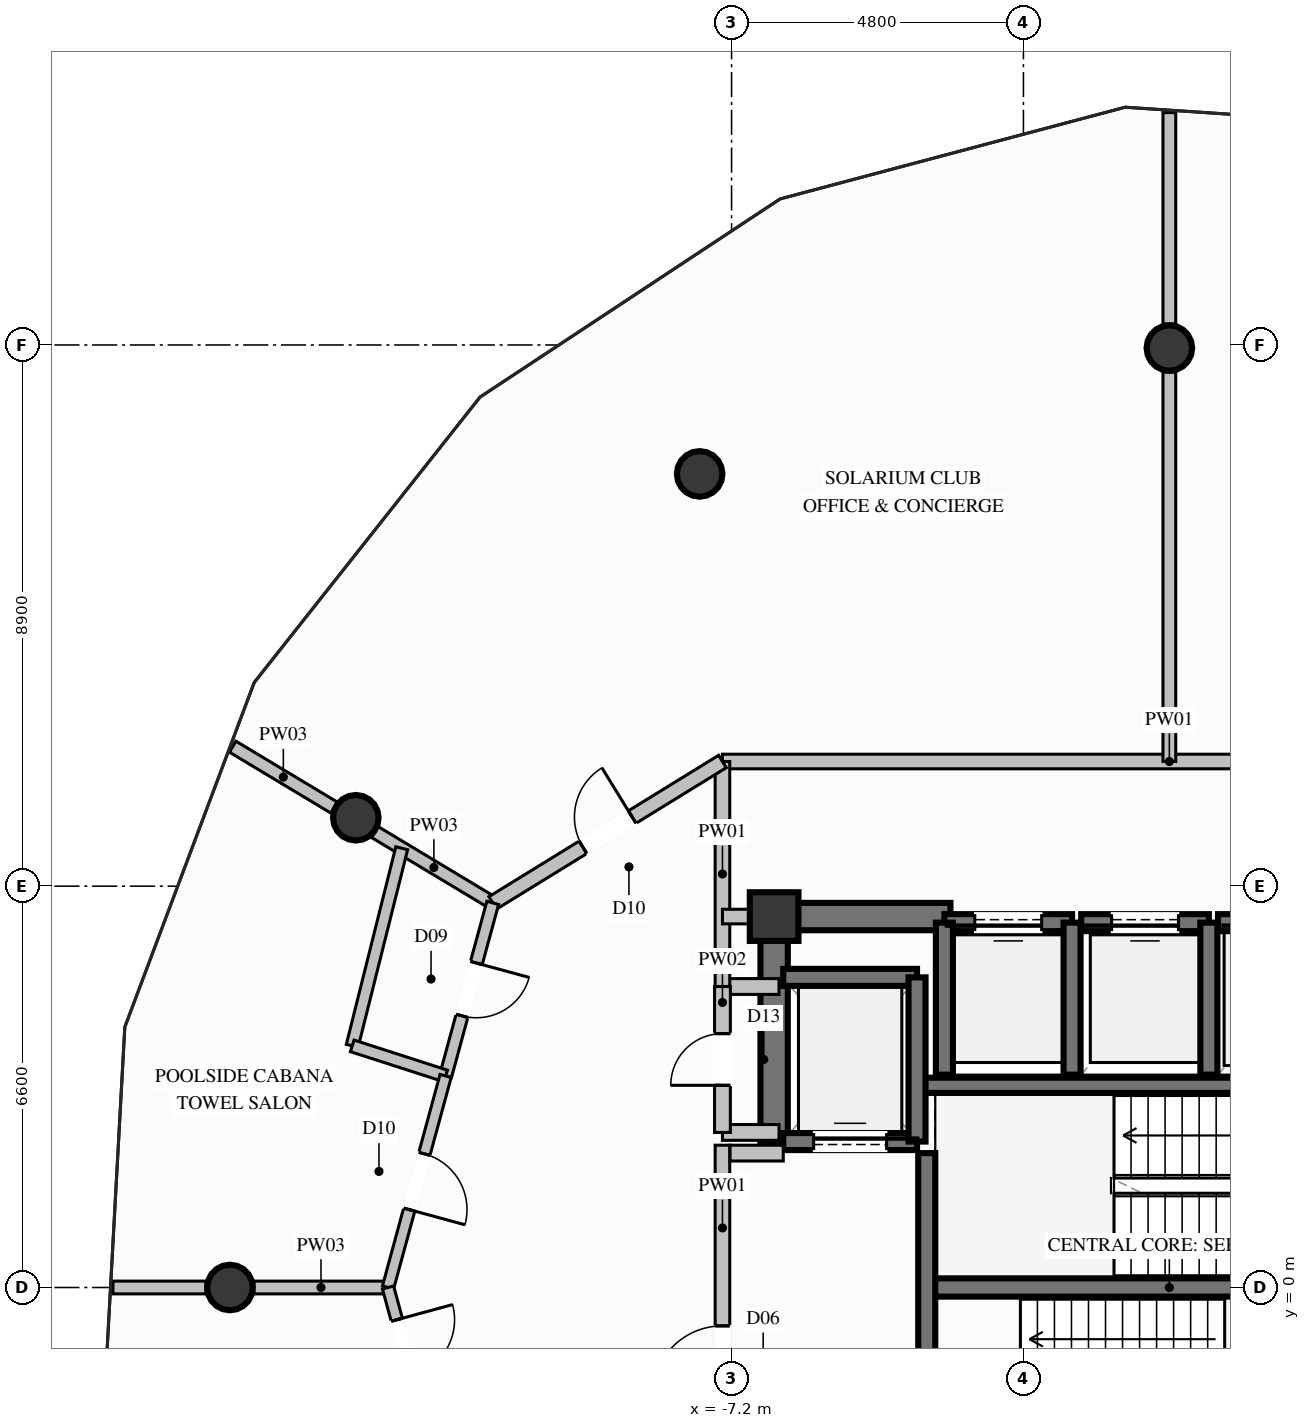
"""IFC4 building model, lengths in metres.
Left out: names, types, materials, properties, quantities, classifications, styles, units other than length and angle.
Written with IfcOpenShell. Run it as: python <this file> out.ifc"""

import sys

from ifc_helpers import new_model, si_unit, direction, frame, frame_2d, origin, origin_2d, place, context, subcontext, project, spatial, rectangle, circle, extrude, element, fill, save


model = new_model("IFC4")
c1 = context("Model", 3, precision=1e-05, world=origin(), true_north=direction((0.0, 1.0)))
c2 = subcontext(c1, "Body", "Model", "MODEL_VIEW")
j1 = project(units=[si_unit("LENGTHUNIT", "METRE"), si_unit("PLANEANGLEUNIT", "RADIAN")], contexts=[c1])
p1 = place(None, origin())
s1 = spatial("IfcSite", under=j1, at=p1, CompositionType="ELEMENT")
p2 = place(p1, origin())
s2 = spatial("IfcBuilding", under=s1, at=p2, CompositionType="ELEMENT")
p3 = place(p2, frame((0.0, 0.0, 262.0)))
s3 = spatial("IfcBuildingStorey", under=s2, at=p3, CompositionType="ELEMENT", Elevation=262.0)
p4 = place(p3, frame((-6.5, 6.1, 0.0), z_axis=(0.0, 0.0, 1.0), x_axis=(1.0, 0.0, 0.0)))
e1 = element("IfcColumn", 1, at=p4, inside=s3, PredefinedType="COLUMN", context=c2, shape_type="SweptSolid", body=[
    extrude(rectangle(XDim=0.8, YDim=0.8, at=origin_2d()), origin(), (0.0, 0.0, 1.0), 4.8),
])
p5 = place(p3, frame((-3.99, 0.0, 0.0), z_axis=(0.0, 0.0, 1.0), x_axis=(1.0, 0.0, 0.0)))
e2 = element("IfcWall", 2, at=p5, inside=s3, PredefinedType="SHEAR", context=c2, shape_type="SweptSolid", body=[
    extrude(rectangle(XDim=7.98, YDim=0.3, at=frame_2d((3.99, 0.0))), origin(), (0.0, 0.0, 1.0), 4.8),
])
p6 = place(p3, frame((-4.13, 3.325, 0.0), z_axis=(0.0, 0.0, 1.0), x_axis=(1.0, 0.0, 0.0)))
e3 = element("IfcWall", 3, at=p6, inside=s3, PredefinedType="SOLIDWALL", context=c2, shape_type="SweptSolid", body=[
    extrude(rectangle(XDim=8.26, YDim=0.25, at=frame_2d((4.13, 0.0))), origin(), (0.0, 0.0, 1.0), 4.8),
])
p7 = place(p3, frame((-6.275, 6.1, 0.0), z_axis=(0.0, 0.0, 1.0), x_axis=(1.0, 0.0, 0.0)))
e4 = element("IfcWall", 4, at=p7, inside=s3, PredefinedType="SHEAR", context=c2, shape_type="SweptSolid", body=[
    extrude(rectangle(XDim=2.675, YDim=0.45, at=frame_2d((1.337, 0.0))), origin(), (0.0, 0.0, 1.0), 4.8),
])
p8 = place(p3, frame((-6.5, 2.35, 0.0), z_axis=(0.0, 0.0, 1.0), x_axis=(0.0, 1.0, 0.0)))
e5 = element("IfcWall", 5, at=p8, inside=s3, PredefinedType="SHEAR", context=c2, shape_type="SweptSolid", body=[
    extrude(rectangle(XDim=3.975, YDim=0.45, at=frame_2d((1.987, 0.0))), origin(), (0.0, 0.0, 1.0), 4.8),
])
for number, where, z_axis, x_axis in (
    (6, (0.0, 15.45, 0.0), (0.0, 0.0, 1.0), (1.0, 0.0, 0.0)),
    (7, (-7.725, 13.38, 0.0), (0.0, 0.0, 1.0), (1.0, 0.0, 0.0)),
    (8, (-13.38, 7.725, 0.0), (0.0, 0.0, 1.0), (1.0, 0.0, 0.0)),
    (9, (-15.45, 0.0, 0.0), (0.0, 0.0, 1.0), (1.0, 0.0, 0.0)),
):
    element("IfcColumn", number, at=place(p3, frame(where, z_axis=z_axis, x_axis=x_axis)), inside=s3, PredefinedType="COLUMN", context=c2, shape_type="SweptSolid", body=[
        extrude(circle(Radius=0.375, at=origin_2d()), origin(), (0.0, 0.0, 1.0), 4.8),
    ])
p9 = place(p3, frame((-1.6, 6.0, 0.0), z_axis=(0.0, 0.0, 1.0), x_axis=(-1.0, 0.0, 0.0)))
e10 = element("IfcWall", 10, at=p9, inside=s3, PredefinedType="SOLIDWALL", context=c2, shape_type="SweptSolid", body=[
    extrude(rectangle(XDim=2.1, YDim=0.28, at=frame_2d((1.05, 0.0))), origin(), (0.0, 0.0, 1.0), 4.57),
])
p10 = place(p9, frame((0.5, 0.0, 0.0)))
e11 = element("IfcOpeningElement", 11, at=p10, cuts=e10, PredefinedType="OPENING", context=c2, shape_type="SweptSolid", body=[
    extrude(rectangle(XDim=1.1, YDim=2.2, at=frame_2d((0.55, 1.1))), frame((0.0, 0.15, 0.0), z_axis=(0.0, -1.0, 0.0), x_axis=(1.0, 0.0, 0.0)), (0.0, 0.0, 1.0), 0.3),
])
for number, where, z_axis, x_axis in (
    (12, (-3.7, 6.0, 0.0), (0.0, 0.0, 1.0), (0.0, -1.0, 0.0)),
    (13, (-1.6, 3.5, 0.0), (0.0, 0.0, 1.0), (0.0, 1.0, 0.0)),
):
    element("IfcWall", number, at=place(p3, frame(where, z_axis=z_axis, x_axis=x_axis)), inside=s3, PredefinedType="SOLIDWALL", context=c2, shape_type="SweptSolid", body=[
        extrude(rectangle(XDim=2.5, YDim=0.28, at=frame_2d((1.25, 0.0))), origin(), (0.0, 0.0, 1.0), 4.57),
    ])
p11 = place(p3, frame((0.65, 6.0, 0.0), z_axis=(0.0, 0.0, 1.0), x_axis=(-1.0, 0.0, 0.0)))
e14 = element("IfcWall", 14, at=p11, inside=s3, PredefinedType="SOLIDWALL", context=c2, shape_type="SweptSolid", body=[
    extrude(rectangle(XDim=2.1, YDim=0.28, at=frame_2d((1.05, 0.0))), origin(), (0.0, 0.0, 1.0), 4.57),
])
p12 = place(p11, frame((0.5, 0.0, 0.0)))
e15 = element("IfcOpeningElement", 15, at=p12, cuts=e14, PredefinedType="OPENING", context=c2, shape_type="SweptSolid", body=[
    extrude(rectangle(XDim=1.1, YDim=2.2, at=frame_2d((0.55, 1.1))), frame((0.0, 0.15, 0.0), z_axis=(0.0, -1.0, 0.0), x_axis=(1.0, 0.0, 0.0)), (0.0, 0.0, 1.0), 0.3),
])
p13 = place(p3, frame((0.65, 3.5, 0.0), z_axis=(0.0, 0.0, 1.0), x_axis=(0.0, 1.0, 0.0)))
e16 = element("IfcWall", 16, at=p13, inside=s3, PredefinedType="SOLIDWALL", context=c2, shape_type="SweptSolid", body=[
    extrude(rectangle(XDim=2.5, YDim=0.28, at=frame_2d((1.25, 0.0))), origin(), (0.0, 0.0, 1.0), 4.57),
])
p14 = place(p3, frame((3.0, 6.0, 0.0), z_axis=(0.0, 0.0, 1.0), x_axis=(-1.0, 0.0, 0.0)))
e17 = element("IfcWall", 17, at=p14, inside=s3, PredefinedType="SOLIDWALL", context=c2, shape_type="SweptSolid", body=[
    extrude(rectangle(XDim=2.2, YDim=0.28, at=frame_2d((1.1, 0.0))), origin(), (0.0, 0.0, 1.0), 4.57),
])
p15 = place(p14, frame((0.55, 0.0, 0.0)))
e18 = element("IfcOpeningElement", 18, at=p15, cuts=e17, PredefinedType="OPENING", context=c2, shape_type="SweptSolid", body=[
    extrude(rectangle(XDim=1.1, YDim=2.2, at=frame_2d((0.55, 1.1))), frame((0.0, 0.15, 0.0), z_axis=(0.0, -1.0, 0.0), x_axis=(1.0, 0.0, 0.0)), (0.0, 0.0, 1.0), 0.3),
])
p16 = place(p3, frame((-6.35, 2.4, 0.0), z_axis=(0.0, 0.0, 1.0), x_axis=(1.0, 0.0, 0.0)))
e19 = element("IfcWall", 19, at=p16, inside=s3, PredefinedType="SOLIDWALL", context=c2, shape_type="SweptSolid", body=[
    extrude(rectangle(XDim=2.2, YDim=0.28, at=frame_2d((1.1, 0.0))), origin(), (0.0, 0.0, 1.0), 4.57),
])
p17 = place(p16, frame((0.5, 0.0, 0.0)))
e20 = element("IfcOpeningElement", 20, at=p17, cuts=e19, PredefinedType="OPENING", context=c2, shape_type="SweptSolid", body=[
    extrude(rectangle(XDim=1.2, YDim=2.2, at=frame_2d((0.6, 1.1))), frame((0.0, 0.15, 0.0), z_axis=(0.0, -1.0, 0.0), x_axis=(1.0, 0.0, 0.0)), (0.0, 0.0, 1.0), 0.3),
])
p18 = place(p3, frame((-4.15, 5.1, 0.0), z_axis=(0.0, 0.0, 1.0), x_axis=(-1.0, 0.0, 0.0)))
e21 = element("IfcWall", 21, at=p18, inside=s3, PredefinedType="SOLIDWALL", context=c2, shape_type="SweptSolid", body=[
    extrude(rectangle(XDim=2.2, YDim=0.28, at=frame_2d((1.1, 0.0))), origin(), (0.0, 0.0, 1.0), 4.57),
])
p19 = place(p3, frame((-4.15, 2.4, 0.0), z_axis=(0.0, 0.0, 1.0), x_axis=(0.0, 1.0, 0.0)))
e22 = element("IfcWall", 22, at=p19, inside=s3, PredefinedType="SOLIDWALL", context=c2, shape_type="SweptSolid", body=[
    extrude(rectangle(XDim=2.7, YDim=0.28, at=frame_2d((1.35, 0.0))), origin(), (0.0, 0.0, 1.0), 4.57),
])
p20 = place(p3, frame((-3.99, -3.25, 0.0), z_axis=(0.0, 0.0, 1.0), x_axis=(0.0, 1.0, 0.0)))
e23 = element("IfcWall", 23, at=p20, inside=s3, PredefinedType="SOLIDWALL", context=c2, shape_type="SweptSolid", body=[
    extrude(rectangle(XDim=5.46, YDim=0.28, at=frame_2d((2.73, 0.0))), origin(), (0.0, 0.0, 1.0), 4.57),
])
p21 = place(p20, frame((0.937, 0.0, 0.0)))
e24 = element("IfcOpeningElement", 24, at=p21, cuts=e23, PredefinedType="OPENING", context=c2, shape_type="SweptSolid", body=[
    extrude(rectangle(XDim=1.2, YDim=2.2, at=frame_2d((0.6, 1.1))), frame((0.0, 0.15, 0.0), z_axis=(0.0, -1.0, 0.0), x_axis=(1.0, 0.0, 0.0)), (0.0, 0.0, 1.0), 0.3),
])
p22 = place(p3, frame((-7.35, -3.38, 0.0), z_axis=(0.0, 0.0, 1.0), x_axis=(0.0, 1.0, 0.0)))
e25 = element("IfcWall", 25, at=p22, inside=s3, PredefinedType="PARTITIONING", context=c2, shape_type="SweptSolid", body=[
    extrude(rectangle(XDim=5.72, YDim=0.24, at=frame_2d((2.86, 0.0))), origin(), (0.0, 0.0, 1.0), 3.455),
])
p23 = place(p22, frame((1.599, 0.0, 0.0)))
e26 = element("IfcOpeningElement", 26, at=p23, cuts=e25, PredefinedType="OPENING", context=c2, shape_type="SweptSolid", body=[
    extrude(rectangle(XDim=1.15, YDim=2.2, at=frame_2d((0.575, 1.1))), frame((0.0, 0.13, 0.0), z_axis=(0.0, -1.0, 0.0), x_axis=(1.0, 0.0, 0.0)), (0.0, 0.0, 1.0), 0.26),
])
p24 = place(p3, frame((-7.225, 2.21, 0.0), z_axis=(0.0, 0.0, 1.0), x_axis=(1.0, 0.0, 0.0)))
e27 = element("IfcWall", 27, at=p24, inside=s3, PredefinedType="PARTITIONING", context=c2, shape_type="SweptSolid", body=[
    extrude(rectangle(XDim=0.875, YDim=0.26, at=frame_2d((0.438, 0.0))), origin(), (0.0, 0.0, 1.0), 4.57),
])
for number, where, z_axis, x_axis in (
    (28, (-7.35, 4.95, 0.0), (0.0, 0.0, 1.0), (1.0, 0.0, 0.0)),
    (29, (-7.35, 2.55, 0.0), (0.0, 0.0, 1.0), (1.0, 0.0, 0.0)),
):
    element("IfcWall", number, at=place(p3, frame(where, z_axis=z_axis, x_axis=x_axis)), inside=s3, PredefinedType="PARTITIONING", context=c2, shape_type="SweptSolid", body=[
        extrude(rectangle(XDim=0.93, YDim=0.26, at=frame_2d((0.465, 0.0))), origin(), (0.0, 0.0, 1.0), 4.57),
    ])
p25 = place(p3, frame((-7.35, 2.55, 0.0), z_axis=(0.0, 0.0, 1.0), x_axis=(0.0, 1.0, 0.0)))
e30 = element("IfcWall", 30, at=p25, inside=s3, PredefinedType="PARTITIONING", context=c2, shape_type="SweptSolid", body=[
    extrude(rectangle(XDim=2.4, YDim=0.26, at=frame_2d((1.2, 0.0))), origin(), (0.0, 0.0, 1.0), 3.455),
])
p26 = place(p25, frame((0.775, 0.0, 0.0)))
e31 = element("IfcOpeningElement", 31, at=p26, cuts=e30, PredefinedType="OPENING", context=c2, shape_type="SweptSolid", body=[
    extrude(rectangle(XDim=0.85, YDim=2.05, at=frame_2d((0.425, 1.025))), frame((0.0, 0.14, 0.0), z_axis=(0.0, -1.0, 0.0), x_axis=(1.0, 0.0, 0.0)), (0.0, 0.0, 1.0), 0.28),
])
p27 = place(p3, frame((-7.35, 8.65, 0.0), z_axis=(0.0, 0.0, 1.0), x_axis=(1.0, 0.0, 0.0)))
e32 = element("IfcWall", 32, at=p27, inside=s3, PredefinedType="PARTITIONING", context=c2, shape_type="SweptSolid", body=[
    extrude(rectangle(XDim=14.7, YDim=0.24, at=frame_2d((7.35, 0.0))), origin(), (0.0, 0.0, 1.0), 4.57),
])
p28 = place(p3, frame((-7.35, 4.95, 0.0), z_axis=(0.0, 0.0, 1.0), x_axis=(0.0, 1.0, 0.0)))
e33 = element("IfcWall", 33, at=p28, inside=s3, PredefinedType="PARTITIONING", context=c2, shape_type="SweptSolid", body=[
    extrude(rectangle(XDim=3.7, YDim=0.24, at=frame_2d((1.85, 0.0))), origin(), (0.0, 0.0, 1.0), 3.455),
])
p29 = place(p3, frame((-7.35, 6.1, 0.0), z_axis=(0.0, 0.0, 1.0), x_axis=(1.0, 0.0, 0.0)))
e34 = element("IfcWall", 34, at=p29, inside=s3, PredefinedType="PARTITIONING", context=c2, shape_type="SweptSolid", body=[
    extrude(rectangle(XDim=0.85, YDim=0.24, at=frame_2d((0.425, 0.0))), origin(), (0.0, 0.0, 1.0), 4.011),
])
p30 = place(p3, frame((-11.128, 6.325, 0.0), z_axis=(0.0, 0.0, 1.0), x_axis=(-0.857206654834, 0.514972572967, 0.0)))
e35 = element("IfcWall", 35, at=p30, inside=s3, PredefinedType="PARTITIONING", context=c2, shape_type="SweptSolid", body=[
    extrude(rectangle(XDim=2.259, YDim=0.21, at=frame_2d((1.129, 0.0))), origin(), (0.0, 0.0, 1.0), 4.011),
])
p31 = place(p3, frame((-13.738, 7.893, 0.0), z_axis=(0.0, 0.0, 1.0), x_axis=(-0.857315615311, 0.514791157407, 0.0)))
e36 = element("IfcWall", 36, at=p31, inside=s3, PredefinedType="PARTITIONING", context=c2, shape_type="SweptSolid", body=[
    extrude(rectangle(XDim=1.944, YDim=0.21, at=frame_2d((0.972, 0.0))), origin(), (0.0, 0.0, 1.0), 4.57),
])
p32 = place(p3, frame((-12.85, 0.0, 0.0), z_axis=(0.0, 0.0, 1.0), x_axis=(-1.0, 0.0, 0.0)))
e37 = element("IfcWall", 37, at=p32, inside=s3, PredefinedType="PARTITIONING", context=c2, shape_type="SweptSolid", body=[
    extrude(rectangle(XDim=2.205, YDim=0.21, at=frame_2d((1.103, 0.0))), origin(), (0.0, 0.0, 1.0), 4.57),
])
p33 = place(p3, frame((-15.845, 0.0, 0.0), z_axis=(0.0, 0.0, 1.0), x_axis=(-1.0, 0.0, 0.0)))
e38 = element("IfcWall", 38, at=p33, inside=s3, PredefinedType="PARTITIONING", context=c2, shape_type="SweptSolid", body=[
    extrude(rectangle(XDim=1.529, YDim=0.21, at=frame_2d((0.765, 0.0))), origin(), (0.0, 0.0, 1.0), 4.57),
])
p34 = place(p3, frame((0.0, 8.65, 0.0), z_axis=(0.0, 0.0, 1.0), x_axis=(0.0, 1.0, 0.0)))
e39 = element("IfcWall", 39, at=p34, inside=s3, PredefinedType="PARTITIONING", context=c2, shape_type="SweptSolid", body=[
    extrude(rectangle(XDim=6.405, YDim=0.21, at=frame_2d((3.203, 0.0))), origin(), (0.0, 0.0, 1.0), 4.57),
])
p35 = place(p3, frame((0.0, 15.845, 0.0), z_axis=(0.0, 0.0, 1.0), x_axis=(0.0, 1.0, 0.0)))
e40 = element("IfcWall", 40, at=p35, inside=s3, PredefinedType="PARTITIONING", context=c2, shape_type="SweptSolid", body=[
    extrude(rectangle(XDim=3.476, YDim=0.21, at=frame_2d((1.738, 0.0))), origin(), (0.0, 0.0, 1.0), 4.57),
])
p36 = place(p3, frame((-11.128, 6.325, 0.0), z_axis=(0.0, 0.0, 1.0), x_axis=(0.851645088617, 0.524118920699, 0.0)))
e41 = element("IfcWall", 41, at=p36, inside=s3, PredefinedType="PARTITIONING", context=c2, shape_type="SweptSolid", body=[
    extrude(rectangle(XDim=4.436, YDim=0.24, at=frame_2d((2.218, 0.0))), origin(), (0.0, 0.0, 1.0), 4.57),
])
p37 = place(p36, frame((1.743, 0.0, 0.0)))
e42 = element("IfcOpeningElement", 42, at=p37, cuts=e41, PredefinedType="OPENING", context=c2, shape_type="SweptSolid", body=[
    extrude(rectangle(XDim=0.95, YDim=2.1, at=frame_2d((0.475, 1.05))), frame((0.0, 0.13, 0.0), z_axis=(0.0, -1.0, 0.0), x_axis=(1.0, 0.0, 0.0)), (0.0, 0.0, 1.0), 0.26),
])
p38 = place(p3, frame((-11.128, 6.325, 0.0), z_axis=(0.0, 0.0, 1.0), x_axis=(-0.262795224233, -0.964851631144, 0.0)))
e43 = element("IfcWall", 43, at=p38, inside=s3, PredefinedType="PLUMBINGWALL", context=c2, shape_type="SweptSolid", body=[
    extrude(rectangle(XDim=2.95, YDim=0.2, at=frame_2d((1.475, 0.0))), origin(), (0.0, 0.0, 1.0), 4.57),
])
p39 = place(p38, frame((1.025, 0.0, 0.0)))
e44 = element("IfcOpeningElement", 44, at=p39, cuts=e43, PredefinedType="OPENING", context=c2, shape_type="SweptSolid", body=[
    extrude(rectangle(XDim=0.9, YDim=2.1, at=frame_2d((0.45, 1.05))), frame((0.0, 0.11, 0.0), z_axis=(0.0, -1.0, 0.0), x_axis=(1.0, 0.0, 0.0)), (0.0, 0.0, 1.0), 0.22),
])
p40 = place(p3, frame((-12.625, 7.224, 0.0), z_axis=(0.0, 0.0, 1.0), x_axis=(-0.242947101891, -0.970039538206, 0.0)))
e45 = element("IfcWall", 45, at=p40, inside=s3, PredefinedType="PLUMBINGWALL", context=c2, shape_type="SweptSolid", body=[
    extrude(rectangle(XDim=3.35, YDim=0.2, at=frame_2d((1.675, 0.0))), origin(), (0.0, 0.0, 1.0), 4.57),
])
p41 = place(p3, frame((-11.903, 3.479, 0.0), z_axis=(0.0, 0.0, 1.0), x_axis=(-0.951768488443, 0.30681711883, 0.0)))
e46 = element("IfcWall", 46, at=p41, inside=s3, PredefinedType="PLUMBINGWALL", context=c2, shape_type="SweptSolid", body=[
    extrude(rectangle(XDim=1.614, YDim=0.2, at=frame_2d((0.807, 0.0))), origin(), (0.0, 0.0, 1.0), 4.57),
])
p42 = place(p3, frame((-11.903, 3.479, 0.0), z_axis=(0.0, 0.0, 1.0), x_axis=(-0.262653290471, -0.964890278221, 0.0)))
e47 = element("IfcWall", 47, at=p42, inside=s3, PredefinedType="PARTITIONING", context=c2, shape_type="SweptSolid", body=[
    extrude(rectangle(XDim=3.606, YDim=0.19, at=frame_2d((1.803, 0.0))), origin(), (0.0, 0.0, 1.0), 4.57),
])
p43 = place(p42, frame((1.328, 0.0, 0.0)))
e48 = element("IfcOpeningElement", 48, at=p43, cuts=e47, PredefinedType="OPENING", context=c2, shape_type="SweptSolid", body=[
    extrude(rectangle(XDim=0.95, YDim=2.1, at=frame_2d((0.475, 1.05))), frame((0.0, 0.105, 0.0), z_axis=(0.0, -1.0, 0.0), x_axis=(1.0, 0.0, 0.0)), (0.0, 0.0, 1.0), 0.21),
])
p44 = place(p3, frame((-12.85, 0.0, 0.0), z_axis=(0.0, 0.0, 1.0), x_axis=(0.262717156474, -0.964872890952, 0.0)))
e49 = element("IfcWall", 49, at=p44, inside=s3, PredefinedType="PARTITIONING", context=c2, shape_type="SweptSolid", body=[
    extrude(rectangle(XDim=6.555, YDim=0.19, at=frame_2d((3.278, 0.0))), origin(), (0.0, 0.0, 1.0), 4.57),
])
p45 = place(p44, frame((0.55, 0.0, 0.0)))
e50 = element("IfcOpeningElement", 50, at=p45, cuts=e49, PredefinedType="OPENING", context=c2, shape_type="SweptSolid", body=[
    extrude(rectangle(XDim=0.95, YDim=2.1, at=frame_2d((0.475, 1.05))), frame((0.0, 0.105, 0.0), z_axis=(0.0, -1.0, 0.0), x_axis=(1.0, 0.0, 0.0)), (0.0, 0.0, 1.0), 0.21),
])
p46 = place(p44, frame((4.405, 0.0, 0.9)))
e51 = element("IfcOpeningElement", 51, at=p46, cuts=e49, PredefinedType="OPENING", context=c2, shape_type="SweptSolid", body=[
    extrude(rectangle(XDim=1.6, YDim=1.4, at=frame_2d((0.8, 0.7))), frame((0.0, 0.105, 0.0), z_axis=(0.0, -1.0, 0.0), x_axis=(1.0, 0.0, 0.0)), (0.0, 0.0, 1.0), 0.21),
])
p47 = place(p10, origin())
e52 = element("IfcDoor", 52, at=p47, inside=s3, OperationType="SLIDING_TO_LEFT", PredefinedType="DOOR", context=c2, shape_type="SweptSolid", body=[
    extrude(rectangle(XDim=1.1, YDim=2.2, at=frame_2d((0.55, 1.1))), frame((0.0, 0.025, 0.0), z_axis=(0.0, -1.0, 0.0), x_axis=(1.0, 0.0, 0.0)), (0.0, 0.0, 1.0), 0.05),
])
fill(e11, e52)
p48 = place(p12, origin())
e53 = element("IfcDoor", 53, at=p48, inside=s3, OperationType="SLIDING_TO_LEFT", PredefinedType="DOOR", context=c2, shape_type="SweptSolid", body=[
    extrude(rectangle(XDim=1.1, YDim=2.2, at=frame_2d((0.55, 1.1))), frame((0.0, 0.025, 0.0), z_axis=(0.0, -1.0, 0.0), x_axis=(1.0, 0.0, 0.0)), (0.0, 0.0, 1.0), 0.05),
])
fill(e15, e53)
p49 = place(p17, origin())
e54 = element("IfcDoor", 54, at=p49, inside=s3, OperationType="SLIDING_TO_LEFT", PredefinedType="DOOR", context=c2, shape_type="SweptSolid", body=[
    extrude(rectangle(XDim=1.2, YDim=2.2, at=frame_2d((0.6, 1.1))), frame((0.0, 0.025, 0.0), z_axis=(0.0, -1.0, 0.0), x_axis=(1.0, 0.0, 0.0)), (0.0, 0.0, 1.0), 0.05),
])
fill(e20, e54)
p50 = place(p23, origin())
e55 = element("IfcDoor", 55, at=p50, inside=s3, OperationType="SINGLE_SWING_LEFT", PredefinedType="DOOR", context=c2, shape_type="SweptSolid", body=[
    extrude(rectangle(XDim=1.15, YDim=2.2, at=frame_2d((0.575, 1.1))), frame((0.0, 0.025, 0.0), z_axis=(0.0, -1.0, 0.0), x_axis=(1.0, 0.0, 0.0)), (0.0, 0.0, 1.0), 0.05),
])
fill(e26, e55)
p51 = place(p26, origin())
e56 = element("IfcDoor", 56, at=p51, inside=s3, OperationType="SINGLE_SWING_LEFT", PredefinedType="DOOR", context=c2, shape_type="SweptSolid", body=[
    extrude(rectangle(XDim=0.85, YDim=2.05, at=frame_2d((0.425, 1.025))), frame((0.0, 0.025, 0.0), z_axis=(0.0, -1.0, 0.0), x_axis=(1.0, 0.0, 0.0)), (0.0, 0.0, 1.0), 0.05),
])
fill(e31, e56)
p52 = place(p37, origin())
e57 = element("IfcDoor", 57, at=p52, inside=s3, OperationType="SINGLE_SWING_RIGHT", PredefinedType="DOOR", context=c2, shape_type="SweptSolid", body=[
    extrude(rectangle(XDim=0.95, YDim=2.1, at=frame_2d((0.475, 1.05))), frame((0.0, 0.025, 0.0), z_axis=(0.0, -1.0, 0.0), x_axis=(1.0, 0.0, 0.0)), (0.0, 0.0, 1.0), 0.05),
])
fill(e42, e57)
p53 = place(p39, origin())
e58 = element("IfcDoor", 58, at=p53, inside=s3, OperationType="SINGLE_SWING_LEFT", PredefinedType="DOOR", context=c2, shape_type="SweptSolid", body=[
    extrude(rectangle(XDim=0.9, YDim=2.1, at=frame_2d((0.45, 1.05))), frame((0.0, 0.025, 0.0), z_axis=(0.0, -1.0, 0.0), x_axis=(1.0, 0.0, 0.0)), (0.0, 0.0, 1.0), 0.05),
])
fill(e44, e58)
p54 = place(p43, origin())
e59 = element("IfcDoor", 59, at=p54, inside=s3, OperationType="SINGLE_SWING_RIGHT", PredefinedType="DOOR", context=c2, shape_type="SweptSolid", body=[
    extrude(rectangle(XDim=0.95, YDim=2.1, at=frame_2d((0.475, 1.05))), frame((0.0, 0.025, 0.0), z_axis=(0.0, -1.0, 0.0), x_axis=(1.0, 0.0, 0.0)), (0.0, 0.0, 1.0), 0.05),
])
fill(e48, e59)
p55 = place(p45, origin())
e60 = element("IfcDoor", 60, at=p55, inside=s3, OperationType="SINGLE_SWING_LEFT", PredefinedType="DOOR", context=c2, shape_type="SweptSolid", body=[
    extrude(rectangle(XDim=0.95, YDim=2.1, at=frame_2d((0.475, 1.05))), frame((0.0, 0.025, 0.0), z_axis=(0.0, -1.0, 0.0), x_axis=(1.0, 0.0, 0.0)), (0.0, 0.0, 1.0), 0.05),
])
fill(e50, e60)
save(model, sys.argv[1])
